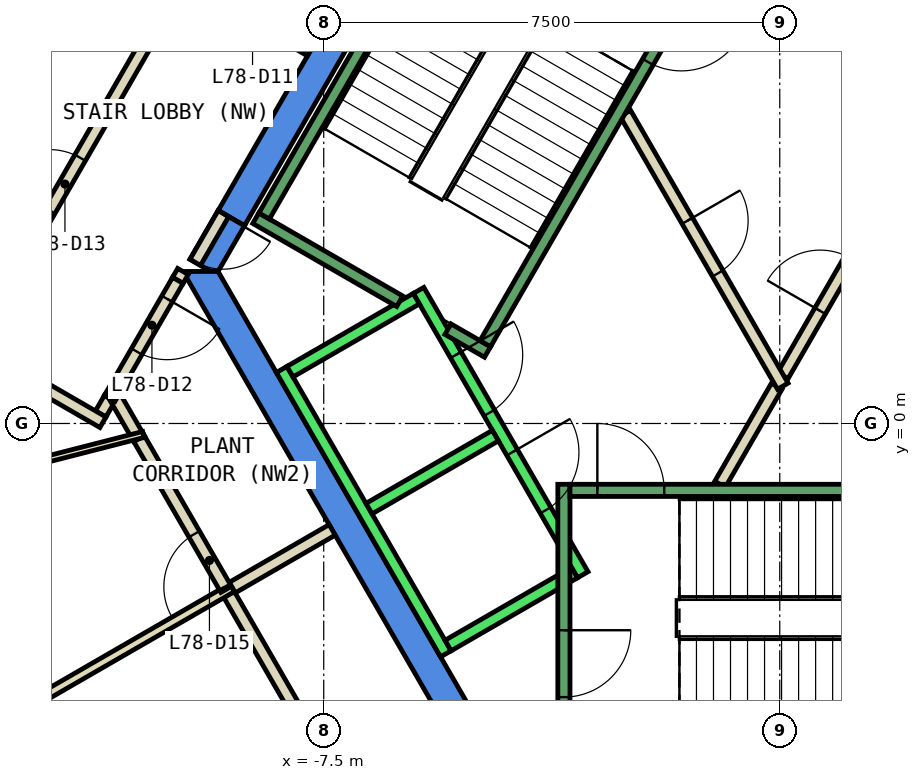
"""IFC4 building model, lengths in metres.
Left out: names, types, materials, properties, quantities, classifications, styles, units other than length and angle.
Written with IfcOpenShell. Run it as: python <this file> out.ifc"""

import sys

from ifc_helpers import new_model, si_unit, direction, frame, frame_2d, origin, place, context, subcontext, project, spatial, polyline, rectangle, outline, extrude, element, fill, save


model = new_model("IFC4")
c1 = context("Model", 3, precision=1e-05, world=origin(), true_north=direction((0.0, 1.0)))
c2 = subcontext(c1, "Body", "Model", "MODEL_VIEW")
j1 = project(units=[si_unit("LENGTHUNIT", "METRE"), si_unit("PLANEANGLEUNIT", "RADIAN")], contexts=[c1])
p1 = place(None, origin())
s1 = spatial("IfcSite", under=j1, at=p1, CompositionType="ELEMENT")
p2 = place(p1, origin())
s2 = spatial("IfcBuilding", under=s1, at=p2, CompositionType="ELEMENT")
p3 = place(p2, frame((0.0, 0.0, 331.4)))
s3 = spatial("IfcBuildingStorey", under=s2, at=p3, CompositionType="ELEMENT", Elevation=331.4)
p4 = place(p3, frame((0.0, 0.0, -0.45)))
e1 = element("IfcWall", 1, at=p4, inside=s3, PredefinedType="SHEAR", context=c2, shape_type="SweptSolid", body=[
    extrude(outline(polyline([(-9.236, 3.502), (-8.803, 3.253), (-4.619, 10.5), (-4.907, 11.0), (-9.236, 3.502)])), origin(), (0.0, 0.0, 1.0), 4.6),
])
p5 = place(p3, frame((0.0, 0.0, 3.6)))
e2 = element("IfcWall", 2, at=p5, inside=s3, PredefinedType="SHEAR", context=c2, shape_type="SweptSolid", body=[
    extrude(outline(polyline([(-9.7, 2.7), (-9.354, 2.5), (-9.238, 2.5), (-8.803, 3.253), (-9.236, 3.502), (-9.7, 2.7)])), origin(), (0.0, 0.0, 1.0), 0.55),
])
p6 = place(p3, frame((0.0, 0.0, -0.45)))
e3 = element("IfcWall", 3, at=p6, inside=s3, PredefinedType="SHEAR", context=c2, shape_type="SweptSolid", body=[
    extrude(outline(polyline([(-9.815, 2.5), (-4.907, -6.0), (-4.619, -5.5), (-9.238, 2.5), (-9.815, 2.5)])), origin(), (0.0, 0.0, 1.0), 4.6),
])
p7 = place(p3, frame((-0.982, -1.0, 0.0), z_axis=(0.0, 0.0, 1.0), x_axis=(0.50024047865, 0.865886518847, 0.0)))
e4 = element("IfcWall", 4, at=p7, inside=s3, PredefinedType="PARTITIONING", context=c2, shape_type="SweptSolid", body=[
    extrude(rectangle(XDim=1.863, YDim=0.2, at=frame_2d((0.931, 0.0))), origin(), (0.0, 0.0, 1.0), 4.15),
])
p8 = place(p3, frame((0.05, 0.787, 0.0), z_axis=(0.0, 0.0, 1.0), x_axis=(0.499954076797, 0.866051915934, 0.0)))
e5 = element("IfcWall", 5, at=p8, inside=s3, PredefinedType="PARTITIONING", context=c2, shape_type="SweptSolid", body=[
    extrude(rectangle(XDim=3.558, YDim=0.2, at=frame_2d((1.779, 0.0))), origin(), (0.0, 0.0, 1.0), 4.15),
])
p9 = place(p8, frame((1.229, 0.0, 0.0)))
e6 = element("IfcOpeningElement", 6, at=p9, cuts=e5, PredefinedType="OPENING", context=c2, shape_type="SweptSolid", body=[
    extrude(rectangle(XDim=1.0, YDim=2.1, at=frame_2d((0.5, 1.05))), frame((0.0, 0.11, 0.0), z_axis=(0.0, -1.0, 0.0), x_axis=(1.0, 0.0, 0.0)), (0.0, 0.0, 1.0), 0.22),
])
p10 = place(p3, frame((-2.54, 5.1, 0.0), z_axis=(0.0, 0.0, 1.0), x_axis=(0.499925051871, -0.866068670783, 0.0)))
e7 = element("IfcWall", 7, at=p10, inside=s3, PredefinedType="PARTITIONING", context=c2, shape_type="SweptSolid", body=[
    extrude(rectangle(XDim=5.181, YDim=0.2, at=frame_2d((2.59, 0.0))), origin(), (0.0, 0.0, 1.0), 4.15),
])
p11 = place(p10, frame((2.04, 0.0, 0.0)))
e8 = element("IfcOpeningElement", 8, at=p11, cuts=e7, PredefinedType="OPENING", context=c2, shape_type="SweptSolid", body=[
    extrude(rectangle(XDim=1.0, YDim=2.1, at=frame_2d((0.5, 1.05))), frame((0.0, 0.11, 0.0), z_axis=(0.0, -1.0, 0.0), x_axis=(1.0, 0.0, 0.0)), (0.0, 0.0, 1.0), 0.22),
])
p12 = place(p3, frame((-6.112, -7.913, 0.0), z_axis=(0.0, 0.0, 1.0), x_axis=(-0.499915430684, 0.866074224396, 0.0)))
e9 = element("IfcWall", 9, at=p12, inside=s3, PredefinedType="PARTITIONING", context=c2, shape_type="SweptSolid", body=[
    extrude(rectangle(XDim=5.987, YDim=0.2, at=frame_2d((2.993, 0.0))), origin(), (0.0, 0.0, 1.0), 4.15),
])
p13 = place(p3, frame((-9.006, -2.7, 0.0), z_axis=(0.0, 0.0, 1.0), x_axis=(0.865980106173, 0.500078449558, 0.0)))
e10 = element("IfcWall", 10, at=p13, inside=s3, PredefinedType="PARTITIONING", context=c2, shape_type="SweptSolid", body=[
    extrude(rectangle(XDim=1.9, YDim=0.2, at=frame_2d((0.95, 0.0))), origin(), (0.0, 0.0, 1.0), 4.15),
])
p14 = place(p3, frame((-21.68, -10.018, 0.0), z_axis=(0.0, 0.0, 1.0), x_axis=(0.865999449672, 0.500044951147, 0.0)))
e11 = element("IfcWall", 11, at=p14, inside=s3, PredefinedType="PARTITIONING", context=c2, shape_type="SweptSolid", body=[
    extrude(rectangle(XDim=14.635, YDim=0.15, at=frame_2d((7.317, 0.0))), origin(), (0.0, 0.0, 1.0), 4.15),
])
p15 = place(p3, frame((-9.45, 7.132, 0.0), z_axis=(0.0, 0.0, 1.0), x_axis=(0.866010750942, -0.50002537861, 0.0)))
e12 = element("IfcWall", 12, at=p15, inside=s3, PredefinedType="PARTITIONING", context=c2, shape_type="SweptSolid", body=[
    extrude(rectangle(XDim=2.0, YDim=0.2, at=frame_2d((1.0, 0.0))), origin(), (0.0, 0.0, 1.0), 4.15),
])
p16 = place(p15, frame((0.4, 0.0, 0.0)))
e13 = element("IfcOpeningElement", 13, at=p16, cuts=e12, PredefinedType="OPENING", context=c2, shape_type="SweptSolid", body=[
    extrude(rectangle(XDim=1.0, YDim=2.1, at=frame_2d((0.5, 1.05))), frame((0.0, 0.11, 0.0), z_axis=(0.0, -1.0, 0.0), x_axis=(1.0, 0.0, 0.0)), (0.0, 0.0, 1.0), 0.22),
])
p17 = place(p3, frame((-9.815, 2.5, 0.0), z_axis=(0.0, 0.0, 1.0), x_axis=(-0.5004692653, -0.865754303766, 0.0)))
e14 = element("IfcWall", 14, at=p17, inside=s3, PredefinedType="PARTITIONING", context=c2, shape_type="SweptSolid", body=[
    extrude(rectangle(XDim=0.17, YDim=0.2, at=frame_2d((0.085, 0.0))), origin(), (0.0, 0.0, 1.0), 2.4),
])
p18 = place(p3, frame((-11.02, 0.413, 0.0), z_axis=(0.0, 0.0, 1.0), x_axis=(-0.500222587251, -0.865896854829, 0.0)))
e15 = element("IfcWall", 15, at=p18, inside=s3, PredefinedType="PARTITIONING", context=c2, shape_type="SweptSolid", body=[
    extrude(rectangle(XDim=0.296, YDim=0.2, at=frame_2d((0.148, 0.0))), origin(), (0.0, 0.0, 1.0), 4.15),
])
p19 = place(p3, frame((-11.131, 0.02, 0.0), z_axis=(0.0, 0.0, 1.0), x_axis=(-0.865973769406, 0.500089422704, 0.0)))
e16 = element("IfcWall", 16, at=p19, inside=s3, PredefinedType="PARTITIONING", context=c2, shape_type="SweptSolid", body=[
    extrude(rectangle(XDim=2.399, YDim=0.2, at=frame_2d((1.2, 0.0))), origin(), (0.0, 0.0, 1.0), 4.15),
])
p20 = place(p3, frame((-13.346, 1.183, 0.0), z_axis=(0.0, 0.0, 1.0), x_axis=(0.49998814853, 0.866032246126, 0.0)))
e17 = element("IfcWall", 17, at=p20, inside=s3, PredefinedType="PARTITIONING", context=c2, shape_type="SweptSolid", body=[
    extrude(rectangle(XDim=6.31, YDim=0.2, at=frame_2d((3.155, 0.0))), origin(), (0.0, 0.0, 1.0), 4.15),
])
p21 = place(p20, frame((2.68, 0.0, 0.0)))
e18 = element("IfcOpeningElement", 18, at=p21, cuts=e17, PredefinedType="OPENING", context=c2, shape_type="SweptSolid", body=[
    extrude(rectangle(XDim=1.0, YDim=2.1, at=frame_2d((0.5, 1.05))), frame((0.0, 0.11, 0.0), z_axis=(0.0, -1.0, 0.0), x_axis=(1.0, 0.0, 0.0)), (0.0, 0.0, 1.0), 0.22),
])
p22 = place(p3, frame((-10.537, -0.249, 0.0), z_axis=(0.0, 0.0, 1.0), x_axis=(-0.500357525511, 0.865818887912, 0.0)))
e19 = element("IfcWall", 19, at=p22, inside=s3, PredefinedType="PARTITIONING", context=c2, shape_type="SweptSolid", body=[
    extrude(rectangle(XDim=0.865, YDim=0.2, at=frame_2d((0.433, 0.0))), origin(), (0.0, 0.0, 1.0), 4.15),
])
p23 = place(p3, frame((-9.105, -2.728, 0.0), z_axis=(0.0, 0.0, 1.0), x_axis=(-0.500229291894, 0.86589298157, 0.0)))
e20 = element("IfcWall", 20, at=p23, inside=s3, PredefinedType="PARTITIONING", context=c2, shape_type="SweptSolid", body=[
    extrude(rectangle(XDim=2.863, YDim=0.2, at=frame_2d((1.432, 0.0))), origin(), (0.0, 0.0, 1.0), 4.15),
])
p24 = place(p23, frame((0.049, 0.0, 0.0)))
e21 = element("IfcOpeningElement", 21, at=p24, cuts=e20, PredefinedType="OPENING", context=c2, shape_type="SweptSolid", body=[
    extrude(rectangle(XDim=1.0, YDim=2.1, at=frame_2d((0.5, 1.05))), frame((0.0, 0.11, 0.0), z_axis=(0.0, -1.0, 0.0), x_axis=(1.0, 0.0, 0.0)), (0.0, 0.0, 1.0), 0.22),
])
p25 = place(p3, frame((-10.465, -0.181, 0.0), z_axis=(0.0, 0.0, 1.0), x_axis=(-0.968738459131, -0.248084255448, 0.0)))
e22 = element("IfcWall", 22, at=p25, inside=s3, PredefinedType="PARTITIONING", context=c2, shape_type="SweptSolid", body=[
    extrude(rectangle(XDim=9.787, YDim=0.1, at=frame_2d((4.894, 0.0))), origin(), (0.0, 0.0, 1.0), 4.15),
])
p26 = place(p3, frame((-9.15, 3.452, 0.0), z_axis=(0.0, 0.0, 1.0), x_axis=(-0.500079945886, -0.865979242085, 0.0)))
e23 = element("IfcWall", 23, at=p26, inside=s3, PredefinedType="PARTITIONING", context=c2, shape_type="SweptSolid", body=[
    extrude(rectangle(XDim=0.926, YDim=0.2, at=frame_2d((0.463, 0.0))), origin(), (0.0, 0.0, 1.0), 2.4),
])
p27 = place(p26, frame((0.017, 0.0, 0.0)))
e24 = element("IfcOpeningElement", 24, at=p27, cuts=e23, PredefinedType="OPENING", context=c2, shape_type="SweptSolid", body=[
    extrude(rectangle(XDim=0.9, YDim=2.1, at=frame_2d((0.45, 1.05))), frame((0.0, 0.11, 0.0), z_axis=(0.0, -1.0, 0.0), x_axis=(1.0, 0.0, 0.0)), (0.0, 0.0, 1.0), 0.22),
])
p28 = place(p3, frame((-9.9, 2.353, 0.0), z_axis=(0.0, 0.0, 1.0), x_axis=(-0.500030632641, -0.866007717299, 0.0)))
e25 = element("IfcWall", 25, at=p28, inside=s3, PredefinedType="PARTITIONING", context=c2, shape_type="SweptSolid", body=[
    extrude(rectangle(XDim=2.24, YDim=0.2, at=frame_2d((1.12, 0.0))), origin(), (0.0, 0.0, 1.0), 4.15),
])
p29 = place(p28, frame((0.351, 0.0, 0.0)))
e26 = element("IfcOpeningElement", 26, at=p29, cuts=e25, PredefinedType="OPENING", context=c2, shape_type="SweptSolid", body=[
    extrude(rectangle(XDim=1.0, YDim=2.1, at=frame_2d((0.5, 1.05))), frame((0.0, 0.11, 0.0), z_axis=(0.0, -1.0, 0.0), x_axis=(1.0, 0.0, 0.0)), (0.0, 0.0, 1.0), 0.22),
])
p30 = place(p3, frame((-5.94, 2.188, 0.0), z_axis=(0.0, 0.0, 1.0), x_axis=(0.500034260056, -0.866005622828, 0.0)))
e27 = element("IfcWall", 27, at=p30, inside=s3, PredefinedType="STANDARD", context=c2, shape_type="SweptSolid", body=[
    extrude(rectangle(XDim=5.399, YDim=0.2, at=frame_2d((2.7, 0.0))), origin(), (0.0, 0.0, 1.0), 4.15),
])
p31 = place(p30, frame((3.075, 0.0, 0.0)))
e28 = element("IfcOpeningElement", 28, at=p31, cuts=e27, PredefinedType="OPENING", context=c2, shape_type="SweptSolid", body=[
    extrude(rectangle(XDim=1.1, YDim=2.1, at=frame_2d((0.55, 1.05))), frame((0.0, 0.11, 0.0), z_axis=(0.0, -1.0, 0.0), x_axis=(1.0, 0.0, 0.0)), (0.0, 0.0, 1.0), 0.22),
])
p32 = place(p30, frame((1.225, 0.0, 0.0)))
e29 = element("IfcOpeningElement", 29, at=p32, cuts=e27, PredefinedType="OPENING", context=c2, shape_type="SweptSolid", body=[
    extrude(rectangle(XDim=1.1, YDim=2.1, at=frame_2d((0.55, 1.05))), frame((0.0, 0.11, 0.0), z_axis=(0.0, -1.0, 0.0), x_axis=(1.0, 0.0, 0.0)), (0.0, 0.0, 1.0), 0.22),
])
p33 = place(p3, frame((-8.192, 0.888, 0.0), z_axis=(0.0, 0.0, 1.0), x_axis=(0.500034260056, -0.866005622828, 0.0)))
e30 = element("IfcWall", 30, at=p33, inside=s3, PredefinedType="STANDARD", context=c2, shape_type="SweptSolid", body=[
    extrude(rectangle(XDim=5.399, YDim=0.2, at=frame_2d((2.7, 0.0))), origin(), (0.0, 0.0, 1.0), 4.15),
])
for number, where, z_axis, x_axis in (
    (31, (-5.977, 2.052, 0.0), (0.0, 0.0, 1.0), (-0.866, -0.5, 0.0)),
    (32, (-4.677, -0.2, 0.0), (0.0, 0.0, 1.0), (-0.866, -0.5, 0.0)),
):
    element("IfcWall", number, at=place(p3, frame(where, z_axis=z_axis, x_axis=x_axis)), inside=s3, PredefinedType="STANDARD", context=c2, shape_type="SweptSolid", body=[
        extrude(rectangle(XDim=2.399, YDim=0.2, at=frame_2d((1.2, 0.0))), origin(), (0.0, 0.0, 1.0), 4.15),
    ])
p34 = place(p3, frame((-3.377, -2.452, 0.0), z_axis=(0.0, 0.0, 1.0), x_axis=(-0.865955154139, -0.50012165622, 0.0)))
e33 = element("IfcWall", 33, at=p34, inside=s3, PredefinedType="STANDARD", context=c2, shape_type="SweptSolid", body=[
    extrude(rectangle(XDim=2.4, YDim=0.2, at=frame_2d((1.2, 0.0))), origin(), (0.0, 0.0, 1.0), 4.15),
])
p35 = place(p3, frame((-3.55, -1.0, 0.0), z_axis=(0.0, 0.0, 1.0), x_axis=(0.0, -1.0, 0.0)))
e34 = element("IfcWall", 34, at=p35, inside=s3, PredefinedType="STANDARD", context=c2, shape_type="SweptSolid", body=[
    extrude(rectangle(XDim=4.4, YDim=0.2, at=frame_2d((2.2, 0.0))), origin(), (0.0, 0.0, 1.0), 4.15),
])
p36 = place(p35, frame((2.4, 0.0, 0.0)))
e35 = element("IfcOpeningElement", 35, at=p36, cuts=e34, PredefinedType="OPENING", context=c2, shape_type="SweptSolid", body=[
    extrude(rectangle(XDim=1.1, YDim=2.2, at=frame_2d((0.55, 1.1))), frame((0.0, 0.11, 0.0), z_axis=(0.0, -1.0, 0.0), x_axis=(1.0, 0.0, 0.0)), (0.0, 0.0, 1.0), 0.22),
])
p37 = place(p3, frame((-3.45, -1.1, 0.0), z_axis=(0.0, 0.0, 1.0), x_axis=(1.0, 0.0, 0.0)))
e36 = element("IfcWall", 36, at=p37, inside=s3, PredefinedType="STANDARD", context=c2, shape_type="SweptSolid", body=[
    extrude(rectangle(XDim=6.9, YDim=0.2, at=frame_2d((3.45, 0.0))), origin(), (0.0, 0.0, 1.0), 4.15),
])
p38 = place(p37, frame((0.45, 0.0, 0.0)))
e37 = element("IfcOpeningElement", 37, at=p38, cuts=e36, PredefinedType="OPENING", context=c2, shape_type="SweptSolid", body=[
    extrude(rectangle(XDim=1.1, YDim=2.2, at=frame_2d((0.55, 1.1))), frame((0.0, 0.11, 0.0), z_axis=(0.0, -1.0, 0.0), x_axis=(1.0, 0.0, 0.0)), (0.0, 0.0, 1.0), 0.22),
])
p39 = place(p3, frame((-6.25, 2.01, 0.0), z_axis=(0.0, 0.0, 1.0), x_axis=(-0.86611865017, 0.499838457731, 0.0)))
e38 = element("IfcWall", 38, at=p39, inside=s3, PredefinedType="STANDARD", context=c2, shape_type="SweptSolid", body=[
    extrude(rectangle(XDim=2.733, YDim=0.2, at=frame_2d((1.366, 0.0))), origin(), (0.0, 0.0, 1.0), 4.15),
])
p40 = place(p3, frame((-4.806, 1.176, 0.0), z_axis=(0.0, 0.0, 1.0), x_axis=(-0.866558586415, 0.499075361355, 0.0)))
e39 = element("IfcWall", 39, at=p40, inside=s3, PredefinedType="STANDARD", context=c2, shape_type="SweptSolid", body=[
    extrude(rectangle(XDim=0.751, YDim=0.2, at=frame_2d((0.376, 0.0))), origin(), (0.0, 0.0, 1.0), 4.15),
])
p41 = place(p3, frame((-1.393, 7.288, 0.0), z_axis=(0.0, 0.0, 1.0), x_axis=(-0.499963383562, -0.866046543262, 0.0)))
e40 = element("IfcWall", 40, at=p41, inside=s3, PredefinedType="STANDARD", context=c2, shape_type="SweptSolid", body=[
    extrude(rectangle(XDim=6.9, YDim=0.2, at=frame_2d((3.45, 0.0))), origin(), (0.0, 0.0, 1.0), 4.15),
])
p42 = place(p41, frame((0.45, 0.0, 0.0)))
e41 = element("IfcOpeningElement", 41, at=p42, cuts=e40, PredefinedType="OPENING", context=c2, shape_type="SweptSolid", body=[
    extrude(rectangle(XDim=1.1, YDim=2.2, at=frame_2d((0.55, 1.1))), frame((0.0, 0.11, 0.0), z_axis=(0.0, -1.0, 0.0), x_axis=(1.0, 0.0, 0.0)), (0.0, 0.0, 1.0), 0.22),
])
p43 = place(p3, frame((-5.03, 9.388, 0.0), z_axis=(0.0, 0.0, 1.0), x_axis=(-0.499978703459, -0.866037698999, 0.0)))
e42 = element("IfcWall", 42, at=p43, inside=s3, PredefinedType="STANDARD", context=c2, shape_type="SweptSolid", body=[
    extrude(rectangle(XDim=6.9, YDim=0.2, at=frame_2d((3.45, 0.0))), origin(), (0.0, 0.0, 1.0), 4.15),
])
p44 = place(p29, origin())
e43 = element("IfcDoor", 43, at=p44, inside=s3, OperationType="SINGLE_SWING_RIGHT", PredefinedType="DOOR", context=c2, shape_type="SweptSolid", body=[
    extrude(rectangle(XDim=1.0, YDim=2.1, at=frame_2d((0.5, 1.05))), frame((0.0, 0.025, 0.0), z_axis=(0.0, -1.0, 0.0), x_axis=(1.0, 0.0, 0.0)), (0.0, 0.0, 1.0), 0.05),
])
fill(e26, e43)
p45 = place(p21, origin())
e44 = element("IfcDoor", 44, at=p45, inside=s3, OperationType="SINGLE_SWING_LEFT", PredefinedType="DOOR", context=c2, shape_type="SweptSolid", body=[
    extrude(rectangle(XDim=1.0, YDim=2.1, at=frame_2d((0.5, 1.05))), frame((0.0, 0.025, 0.0), z_axis=(0.0, -1.0, 0.0), x_axis=(1.0, 0.0, 0.0)), (0.0, 0.0, 1.0), 0.05),
])
fill(e18, e44)
p46 = place(p24, origin())
e45 = element("IfcDoor", 45, at=p46, inside=s3, OperationType="SINGLE_SWING_LEFT", PredefinedType="DOOR", context=c2, shape_type="SweptSolid", body=[
    extrude(rectangle(XDim=1.0, YDim=2.1, at=frame_2d((0.5, 1.05))), frame((0.0, 0.025, 0.0), z_axis=(0.0, -1.0, 0.0), x_axis=(1.0, 0.0, 0.0)), (0.0, 0.0, 1.0), 0.05),
])
fill(e21, e45)
p47 = place(p9, origin())
e46 = element("IfcDoor", 46, at=p47, inside=s3, OperationType="SINGLE_SWING_RIGHT", PredefinedType="DOOR", context=c2, shape_type="SweptSolid", body=[
    extrude(rectangle(XDim=1.0, YDim=2.1, at=frame_2d((0.5, 1.05))), frame((0.0, 0.025, 0.0), z_axis=(0.0, -1.0, 0.0), x_axis=(1.0, 0.0, 0.0)), (0.0, 0.0, 1.0), 0.05),
])
fill(e6, e46)
p48 = place(p11, origin())
e47 = element("IfcDoor", 47, at=p48, inside=s3, OperationType="SINGLE_SWING_RIGHT", PredefinedType="DOOR", context=c2, shape_type="SweptSolid", body=[
    extrude(rectangle(XDim=1.0, YDim=2.1, at=frame_2d((0.5, 1.05))), frame((0.0, 0.025, 0.0), z_axis=(0.0, -1.0, 0.0), x_axis=(1.0, 0.0, 0.0)), (0.0, 0.0, 1.0), 0.05),
])
fill(e8, e47)
p49 = place(p27, origin())
e48 = element("IfcDoor", 48, at=p49, inside=s3, OperationType="SINGLE_SWING_LEFT", PredefinedType="DOOR", context=c2, shape_type="SweptSolid", body=[
    extrude(rectangle(XDim=0.9, YDim=2.1, at=frame_2d((0.45, 1.05))), frame((0.0, 0.025, 0.0), z_axis=(0.0, -1.0, 0.0), x_axis=(1.0, 0.0, 0.0)), (0.0, 0.0, 1.0), 0.05),
])
fill(e24, e48)
p50 = place(p31, origin())
e49 = element("IfcDoor", 49, at=p50, inside=s3, OperationType="SLIDING_TO_LEFT", PredefinedType="DOOR", context=c2, shape_type="SweptSolid", body=[
    extrude(rectangle(XDim=1.1, YDim=2.1, at=frame_2d((0.55, 1.05))), frame((0.0, 0.025, 0.0), z_axis=(0.0, -1.0, 0.0), x_axis=(1.0, 0.0, 0.0)), (0.0, 0.0, 1.0), 0.05),
])
fill(e28, e49)
p51 = place(p32, origin())
e50 = element("IfcDoor", 50, at=p51, inside=s3, OperationType="SLIDING_TO_LEFT", PredefinedType="DOOR", context=c2, shape_type="SweptSolid", body=[
    extrude(rectangle(XDim=1.1, YDim=2.1, at=frame_2d((0.55, 1.05))), frame((0.0, 0.025, 0.0), z_axis=(0.0, -1.0, 0.0), x_axis=(1.0, 0.0, 0.0)), (0.0, 0.0, 1.0), 0.05),
])
fill(e29, e50)
p52 = place(p38, origin())
e51 = element("IfcDoor", 51, at=p52, inside=s3, OperationType="SINGLE_SWING_LEFT", PredefinedType="DOOR", context=c2, shape_type="SweptSolid", body=[
    extrude(rectangle(XDim=1.1, YDim=2.2, at=frame_2d((0.55, 1.1))), frame((0.0, 0.025, 0.0), z_axis=(0.0, -1.0, 0.0), x_axis=(1.0, 0.0, 0.0)), (0.0, 0.0, 1.0), 0.05),
])
fill(e37, e51)
p53 = place(p36, origin())
e52 = element("IfcDoor", 52, at=p53, inside=s3, OperationType="SINGLE_SWING_LEFT", PredefinedType="DOOR", context=c2, shape_type="SweptSolid", body=[
    extrude(rectangle(XDim=1.1, YDim=2.2, at=frame_2d((0.55, 1.1))), frame((0.0, 0.025, 0.0), z_axis=(0.0, -1.0, 0.0), x_axis=(1.0, 0.0, 0.0)), (0.0, 0.0, 1.0), 0.05),
])
fill(e35, e52)
p54 = place(p42, origin())
e53 = element("IfcDoor", 53, at=p54, inside=s3, OperationType="SINGLE_SWING_LEFT", PredefinedType="DOOR", context=c2, shape_type="SweptSolid", body=[
    extrude(rectangle(XDim=1.1, YDim=2.2, at=frame_2d((0.55, 1.1))), frame((0.0, 0.025, 0.0), z_axis=(0.0, -1.0, 0.0), x_axis=(1.0, 0.0, 0.0)), (0.0, 0.0, 1.0), 0.05),
])
fill(e41, e53)
save(model, sys.argv[1])
